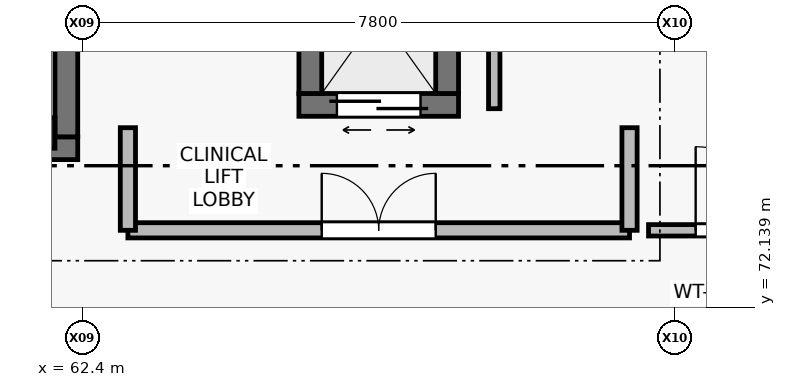
"""IFC4 building model, lengths in metres.
Left out: names, types, materials, properties, quantities, classifications, styles, units other than length and angle.
Written with IfcOpenShell. Run it as: python <this file> out.ifc"""

import sys

from ifc_helpers import new_model, si_unit, direction, frame, frame_2d, origin, origin_2d, place, context, subcontext, project, spatial, rectangle, extrude, element, fill, save


model = new_model("IFC4")
c1 = context("Model", 3, precision=1e-05, world=origin(), true_north=direction((0.0, 1.0)))
c2 = subcontext(c1, "Body", "Model", "MODEL_VIEW")
j1 = project(units=[si_unit("LENGTHUNIT", "METRE"), si_unit("PLANEANGLEUNIT", "RADIAN")], contexts=[c1])
p1 = place(None, origin())
s1 = spatial("IfcSite", under=j1, at=p1, CompositionType="ELEMENT")
p2 = place(p1, origin())
s2 = spatial("IfcBuilding", under=s1, at=p2, CompositionType="ELEMENT")
p3 = place(p2, frame((0.0, 0.0, 4.8)))
s3 = spatial("IfcBuildingStorey", under=s2, at=p3, CompositionType="ELEMENT", Elevation=4.8)
p4 = place(p3, frame((61.84, 74.43, 0.0), z_axis=(0.0, 0.0, 1.0), x_axis=(1.0, 0.0, 0.0)))
e1 = element("IfcColumn", 1, at=p4, inside=s3, PredefinedType="COLUMN", context=c2, shape_type="SweptSolid", body=[
    extrude(rectangle(XDim=0.4, YDim=0.4, at=origin_2d()), origin(), (0.0, 0.0, 1.0), 4.8),
])
p5 = place(p3, frame((54.75, 74.23, 0.0), z_axis=(0.0, 0.0, 1.0), x_axis=(1.0, 0.0, 0.0)))
e2 = element("IfcWall", 2, at=p5, inside=s3, PredefinedType="SHEAR", context=c2, shape_type="SweptSolid", body=[
    extrude(rectangle(XDim=7.59, YDim=0.3, at=frame_2d((3.795, 0.0))), origin(), (0.0, 0.0, 1.0), 4.54),
])
p6 = place(p5, frame((0.59, 0.0, 0.0)))
e3 = element("IfcOpeningElement", 3, at=p6, cuts=e2, PredefinedType="OPENING", context=c2, shape_type="SweptSolid", body=[
    extrude(rectangle(XDim=1.4, YDim=2.2, at=frame_2d((0.7, 1.1))), frame((0.0, 0.16, 0.0), z_axis=(0.0, -1.0, 0.0), x_axis=(1.0, 0.0, 0.0)), (0.0, 0.0, 1.0), 0.32),
])
p7 = place(p3, frame((62.19, 74.38, 0.0), z_axis=(0.0, 0.0, 1.0), x_axis=(0.0, 1.0, 0.0)))
e4 = element("IfcWall", 4, at=p7, inside=s3, PredefinedType="SHEAR", context=c2, shape_type="SweptSolid", body=[
    extrude(rectangle(XDim=3.47, YDim=0.3, at=frame_2d((1.735, 0.0))), origin(), (0.0, 0.0, 1.0), 4.54),
])
p8 = place(p3, frame((65.25, 74.8, 0.0), z_axis=(0.0, 0.0, 1.0), x_axis=(1.0, 0.0, 0.0)))
e5 = element("IfcWall", 5, at=p8, inside=s3, PredefinedType="SHEAR", context=c2, shape_type="SweptSolid", body=[
    extrude(rectangle(XDim=2.1, YDim=0.3, at=frame_2d((1.05, 0.0))), origin(), (0.0, 0.0, 1.0), 4.54),
])
p9 = place(p8, frame((0.5, 0.0, 0.0)))
e6 = element("IfcOpeningElement", 6, at=p9, cuts=e5, PredefinedType="OPENING", context=c2, shape_type="SweptSolid", body=[
    extrude(rectangle(XDim=1.1, YDim=2.2, at=frame_2d((0.55, 1.1))), frame((0.0, 0.16, 0.0), z_axis=(0.0, -1.0, 0.0), x_axis=(1.0, 0.0, 0.0)), (0.0, 0.0, 1.0), 0.32),
])
for number, where, z_axis, x_axis in (
    (7, (65.4, 77.05, 0.0), (0.0, 0.0, 1.0), (0.0, -1.0, 0.0)),
    (8, (67.2, 74.95, 0.0), (0.0, 0.0, 1.0), (0.0, 1.0, 0.0)),
):
    element("IfcWall", number, at=place(p3, frame(where, z_axis=z_axis, x_axis=x_axis)), inside=s3, PredefinedType="SHEAR", context=c2, shape_type="SweptSolid", body=[
        extrude(rectangle(XDim=2.1, YDim=0.3, at=frame_2d((1.05, 0.0))), origin(), (0.0, 0.0, 1.0), 4.54),
    ])
p10 = place(p3, frame((63.0, 73.15, 0.0), z_axis=(0.0, 0.0, 1.0), x_axis=(1.0, 0.0, 0.0)))
e9 = element("IfcWall", 9, at=p10, inside=s3, PredefinedType="SOLIDWALL", context=c2, shape_type="SweptSolid", body=[
    extrude(rectangle(XDim=6.6, YDim=0.2, at=frame_2d((3.3, 0.0))), origin(), (0.0, 0.0, 1.0), 4.54),
])
p11 = place(p10, frame((2.55, 0.0, 0.0)))
e10 = element("IfcOpeningElement", 10, at=p11, cuts=e9, PredefinedType="OPENING", context=c2, shape_type="SweptSolid", body=[
    extrude(rectangle(XDim=1.5, YDim=2.2, at=frame_2d((0.75, 1.1))), frame((0.0, 0.11, 0.0), z_axis=(0.0, -1.0, 0.0), x_axis=(1.0, 0.0, 0.0)), (0.0, 0.0, 1.0), 0.22),
])
for number, where, z_axis, x_axis in (
    (11, (63.0, 74.5, 0.0), (0.0, 0.0, 1.0), (0.0, -1.0, 0.0)),
    (12, (69.6, 73.15, 0.0), (0.0, 0.0, 1.0), (0.0, 1.0, 0.0)),
):
    element("IfcWall", number, at=place(p3, frame(where, z_axis=z_axis, x_axis=x_axis)), inside=s3, PredefinedType="SOLIDWALL", context=c2, shape_type="SweptSolid", body=[
        extrude(rectangle(XDim=1.35, YDim=0.2, at=frame_2d((0.675, 0.0))), origin(), (0.0, 0.0, 1.0), 4.54),
    ])
p12 = place(p3, frame((69.85, 73.15, 0.0), z_axis=(0.0, 0.0, 1.0), x_axis=(1.0, 0.0, 0.0)))
e13 = element("IfcWall", 13, at=p12, inside=s3, PredefinedType="PARTITIONING", context=c2, shape_type="SweptSolid", body=[
    extrude(rectangle(XDim=2.32, YDim=0.15, at=frame_2d((1.16, 0.0))), origin(), (0.0, 0.0, 1.0), 4.54),
])
p13 = place(p12, frame((0.62, 0.0, 0.0)))
e14 = element("IfcOpeningElement", 14, at=p13, cuts=e13, PredefinedType="OPENING", context=c2, shape_type="SweptSolid", body=[
    extrude(rectangle(XDim=1.1, YDim=2.15, at=frame_2d((0.55, 1.075))), frame((0.0, 0.085, 0.0), z_axis=(0.0, -1.0, 0.0), x_axis=(1.0, 0.0, 0.0)), (0.0, 0.0, 1.0), 0.17),
])
p14 = place(p3, frame((67.82, 74.75, 0.0), z_axis=(0.0, 0.0, 1.0), x_axis=(0.0, 1.0, 0.0)))
e15 = element("IfcWall", 15, at=p14, inside=s3, PredefinedType="PARTITIONING", context=c2, shape_type="SweptSolid", body=[
    extrude(rectangle(XDim=3.047, YDim=0.15, at=frame_2d((1.523, 0.0))), origin(), (0.0, 0.0, 1.0), 4.54),
])
p15 = place(p9, origin())
e16 = element("IfcDoor", 16, at=p15, inside=s3, OperationType="DOUBLE_DOOR_SLIDING", PredefinedType="DOOR", context=c2, shape_type="SweptSolid", body=[
    extrude(rectangle(XDim=1.1, YDim=2.2, at=frame_2d((0.55, 1.1))), frame((0.0, 0.025, 0.0), z_axis=(0.0, -1.0, 0.0), x_axis=(1.0, 0.0, 0.0)), (0.0, 0.0, 1.0), 0.05),
])
fill(e6, e16)
p16 = place(p11, origin())
e17 = element("IfcDoor", 17, at=p16, inside=s3, OperationType="DOUBLE_DOOR_SINGLE_SWING", PredefinedType="DOOR", context=c2, shape_type="SweptSolid", body=[
    extrude(rectangle(XDim=1.5, YDim=2.2, at=frame_2d((0.75, 1.1))), frame((0.0, 0.025, 0.0), z_axis=(0.0, -1.0, 0.0), x_axis=(1.0, 0.0, 0.0)), (0.0, 0.0, 1.0), 0.05),
])
fill(e10, e17)
p17 = place(p13, origin())
e18 = element("IfcDoor", 18, at=p17, inside=s3, OperationType="SINGLE_SWING_LEFT", PredefinedType="DOOR", context=c2, shape_type="SweptSolid", body=[
    extrude(rectangle(XDim=1.1, YDim=2.15, at=frame_2d((0.55, 1.075))), frame((0.0, 0.025, 0.0), z_axis=(0.0, -1.0, 0.0), x_axis=(1.0, 0.0, 0.0)), (0.0, 0.0, 1.0), 0.05),
])
fill(e14, e18)
save(model, sys.argv[1])
